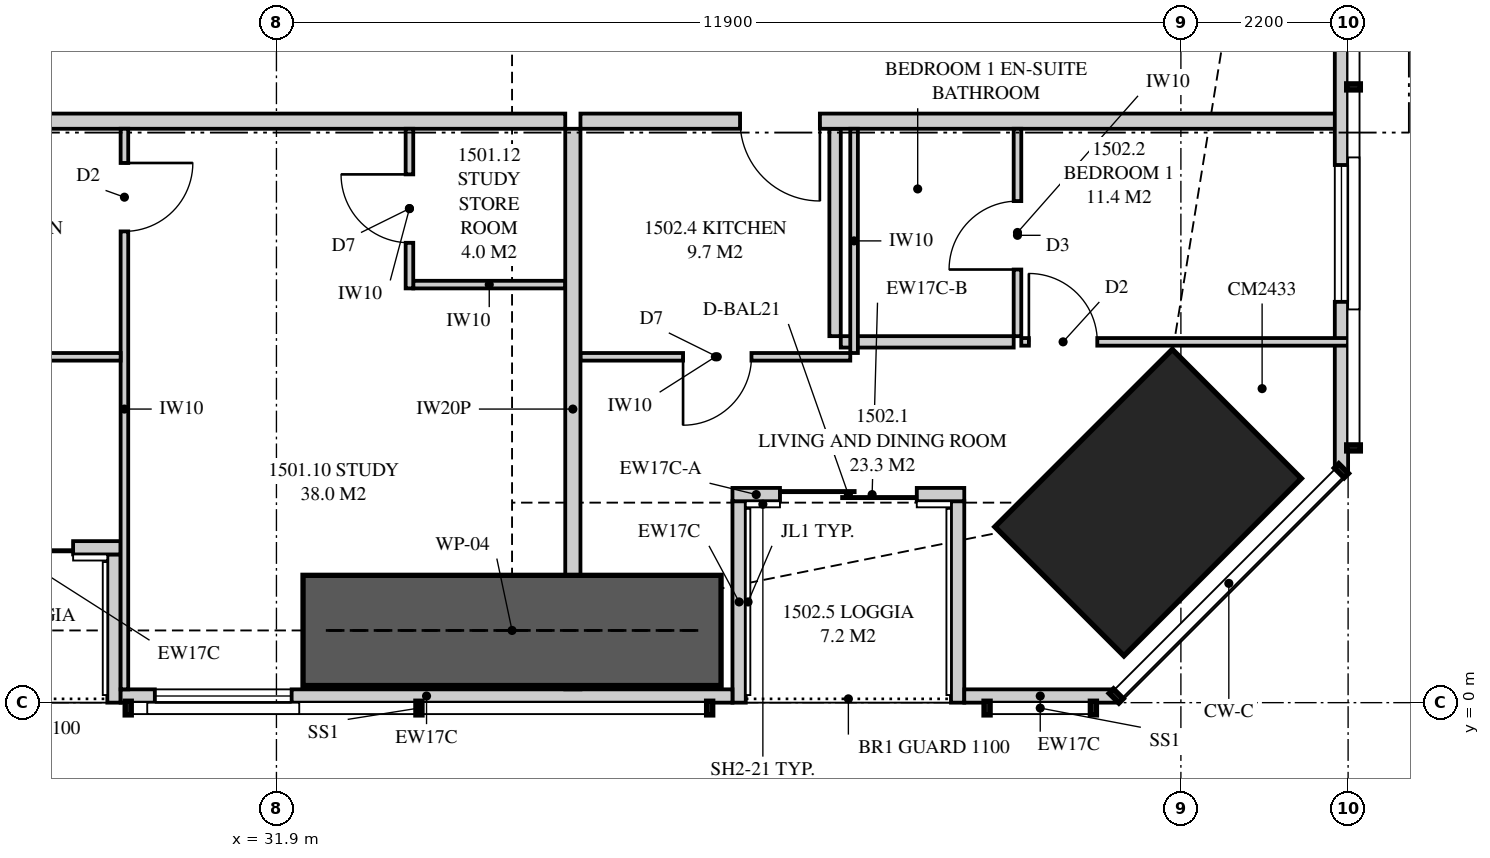
"""IFC4 building model, lengths in metres.
Left out: names, types, materials, properties, quantities, classifications, styles, units other than length and angle.
Written with IfcOpenShell. Run it as: python <this file> out.ifc"""

import sys

from ifc_helpers import new_model, si_unit, direction, frame, frame_2d, origin, origin_2d, place, context, subcontext, project, spatial, polyline, rectangle, outline, extrude, element, fill, save


model = new_model("IFC4")
c1 = context("Model", 3, precision=1e-05, world=origin(), true_north=direction((0.0, 1.0)))
c2 = subcontext(c1, "Body", "Model", "MODEL_VIEW")
j1 = project(units=[si_unit("LENGTHUNIT", "METRE"), si_unit("PLANEANGLEUNIT", "RADIAN")], contexts=[c1])
p1 = place(None, origin())
s1 = spatial("IfcSite", under=j1, at=p1, CompositionType="ELEMENT")
p2 = place(p1, origin())
s2 = spatial("IfcBuilding", under=s1, at=p2, CompositionType="ELEMENT")
p3 = place(p2, frame((0.0, 0.0, 57.85)))
s3 = spatial("IfcBuildingStorey", under=s2, at=p3, CompositionType="ELEMENT", Elevation=57.85)
p4 = place(p3, frame((43.369, 2.631, 0.0), z_axis=(0.0, 0.0, 1.0), x_axis=(-0.707106781187, 0.707106781187, 0.0)))
e1 = element("IfcColumn", 1, at=p4, inside=s3, PredefinedType="COLUMN", context=c2, shape_type="SweptSolid", body=[
    extrude(rectangle(XDim=2.4, YDim=3.3, at=origin_2d()), origin(), (0.0, 0.0, 1.0), 3.35),
])
p5 = place(p3, frame((29.85, 0.087, 0.0), z_axis=(0.0, 0.0, 1.0), x_axis=(1.0, 0.0, 0.0)))
e2 = element("IfcWall", 2, at=p5, inside=s3, PredefinedType="SOLIDWALL", context=c2, shape_type="SweptSolid", body=[
    extrude(outline(polyline([(0.0, 0.0), (8.05, 0.0), (8.05, 3.11), (5.354, 3.11), (5.354, 2.15), (5.306, 2.15), (5.306, 3.11), (5.15, 3.11), (5.15, 2.15), (0.0, 2.15), (0.0, 0.0)])), frame((0.0, 0.087, 0.0), z_axis=(0.0, -1.0, 0.0), x_axis=(1.0, 0.0, 0.0)), (0.0, 0.0, 1.0), 0.175),
])
p6 = place(p5, frame((0.45, 0.0, 0.4)))
e3 = element("IfcOpeningElement", 3, at=p6, cuts=e2, PredefinedType="OPENING", context=c2, shape_type="SweptSolid", body=[
    extrude(rectangle(XDim=1.8, YDim=1.7, at=frame_2d((0.9, 0.85))), frame((0.0, 0.097, 0.0), z_axis=(0.0, -1.0, 0.0), x_axis=(1.0, 0.0, 0.0)), (0.0, 0.0, 1.0), 0.195),
])
p7 = place(p3, frame((40.95, 0.087, 0.0), z_axis=(0.0, 0.0, 1.0), x_axis=(1.0, 0.0, 0.0)))
e4 = element("IfcWall", 4, at=p7, inside=s3, PredefinedType="SOLIDWALL", context=c2, shape_type="SweptSolid", body=[
    extrude(rectangle(XDim=1.999, YDim=0.175, at=frame_2d((1.0, 0.0))), origin(), (0.0, 0.0, 1.0), 3.11),
])
p8 = place(p3, frame((26.8, 2.038, 0.0), z_axis=(0.0, 0.0, 1.0), x_axis=(1.0, 0.0, 0.0)))
e5 = element("IfcWall", 5, at=p8, inside=s3, PredefinedType="SOLIDWALL", context=c2, shape_type="SweptSolid", body=[
    extrude(rectangle(XDim=3.05, YDim=0.175, at=frame_2d((1.525, 0.0))), origin(), (0.0, 0.0, 1.0), 3.11),
])
p9 = place(p8, frame((0.625, 0.0, 0.0)))
e6 = element("IfcOpeningElement", 6, at=p9, cuts=e5, PredefinedType="OPENING", context=c2, shape_type="SweptSolid", body=[
    extrude(rectangle(XDim=1.8, YDim=2.1, at=frame_2d((0.9, 1.05))), frame((0.0, 0.097, 0.0), z_axis=(0.0, -1.0, 0.0), x_axis=(1.0, 0.0, 0.0)), (0.0, 0.0, 1.0), 0.195),
])
p10 = place(p3, frame((29.762, 0.0, 0.0), z_axis=(0.0, 0.0, 1.0), x_axis=(0.0, 1.0, 0.0)))
e7 = element("IfcWall", 7, at=p10, inside=s3, PredefinedType="SOLIDWALL", context=c2, shape_type="SweptSolid", body=[
    extrude(outline(polyline([(0.0, 0.0), (1.95, 0.0), (1.95, 3.11), (1.75, 3.11), (1.75, 2.15), (0.15, 2.15), (0.15, 3.11), (0.0, 3.11), (0.0, 0.0)])), frame((0.0, 0.087, 0.0), z_axis=(0.0, -1.0, 0.0), x_axis=(1.0, 0.0, 0.0)), (0.0, 0.0, 1.0), 0.175),
])
p11 = place(p3, frame((37.9, 2.738, 0.0), z_axis=(0.0, 0.0, 1.0), x_axis=(1.0, 0.0, 0.0)))
e8 = element("IfcWall", 8, at=p11, inside=s3, PredefinedType="SOLIDWALL", context=c2, shape_type="SweptSolid", body=[
    extrude(rectangle(XDim=0.625, YDim=0.175, at=frame_2d((0.312, 0.0))), origin(), (0.0, 0.0, 1.0), 2.51),
])
p12 = place(p3, frame((38.525, 2.738, 0.0), z_axis=(0.0, 0.0, 1.0), x_axis=(1.0, 0.0, 0.0)))
e9 = element("IfcWall", 9, at=p12, inside=s3, PredefinedType="SOLIDWALL", context=c2, shape_type="SweptSolid", body=[
    extrude(rectangle(XDim=2.425, YDim=0.175, at=frame_2d((1.212, 0.0))), origin(), (0.0, 0.0, 1.0), 2.15),
])
p13 = place(p12, origin())
e10 = element("IfcOpeningElement", 10, at=p13, cuts=e9, PredefinedType="OPENING", context=c2, shape_type="SweptSolid", body=[
    extrude(rectangle(XDim=1.8, YDim=2.1, at=frame_2d((0.9, 1.05))), frame((0.0, 0.097, 0.0), z_axis=(0.0, -1.0, 0.0), x_axis=(1.0, 0.0, 0.0)), (0.0, 0.0, 1.0), 0.195),
])
p14 = place(p3, frame((37.988, 0.0, 0.0), z_axis=(0.0, 0.0, 1.0), x_axis=(0.0, 1.0, 0.0)))
e11 = element("IfcWall", 11, at=p14, inside=s3, PredefinedType="SOLIDWALL", context=c2, shape_type="SweptSolid", body=[
    extrude(outline(polyline([(0.0, 0.0), (2.65, 0.0), (2.65, 2.51), (2.384, 2.51), (2.384, 2.15), (0.717, 2.15), (0.717, 3.11), (0.0, 3.11), (0.0, 0.0)])), frame((0.0, 0.087, 0.0), z_axis=(0.0, -1.0, 0.0), x_axis=(1.0, 0.0, 0.0)), (0.0, 0.0, 1.0), 0.175),
])
p15 = place(p3, frame((40.863, 0.0, 0.0), z_axis=(0.0, 0.0, 1.0), x_axis=(0.0, 1.0, 0.0)))
e12 = element("IfcWall", 12, at=p15, inside=s3, PredefinedType="SOLIDWALL", context=c2, shape_type="SweptSolid", body=[
    extrude(outline(polyline([(0.0, 0.0), (2.65, 0.0), (2.65, 2.15), (1.294, 2.15), (1.294, 3.11), (0.0, 3.11), (0.0, 0.0)])), frame((0.0, 0.087, 0.0), z_axis=(0.0, -1.0, 0.0), x_axis=(1.0, 0.0, 0.0)), (0.0, 0.0, 1.0), 0.175),
])
p16 = place(p3, frame((45.913, 3.051, 0.0), z_axis=(0.0, 0.0, 1.0), x_axis=(0.0, 1.0, 0.0)))
e13 = element("IfcWall", 13, at=p16, inside=s3, PredefinedType="SOLIDWALL", context=c2, shape_type="SweptSolid", body=[
    extrude(outline(polyline([(0.0, 0.0), (31.897, 0.0), (31.897, 3.11), (22.167, 3.11), (22.167, 2.15), (22.074, 2.15), (22.074, 3.11), (21.949, 3.11), (21.949, 2.15), (9.949, 2.15), (9.949, 3.11), (9.823, 3.11), (9.823, 2.15), (9.73, 2.15), (9.73, 3.11), (0.0, 3.11), (0.0, 0.0)])), frame((0.0, 0.087, 0.0), z_axis=(0.0, -1.0, 0.0), x_axis=(1.0, 0.0, 0.0)), (0.0, 0.0, 1.0), 0.175),
])
p17 = place(p16, frame((2.222, 0.0, 0.4)))
e14 = element("IfcOpeningElement", 14, at=p17, cuts=e13, PredefinedType="OPENING", context=c2, shape_type="SweptSolid", body=[
    extrude(rectangle(XDim=1.8, YDim=1.7, at=frame_2d((0.9, 0.85))), frame((0.0, 0.097, 0.0), z_axis=(0.0, -1.0, 0.0), x_axis=(1.0, 0.0, 0.0)), (0.0, 0.0, 1.0), 0.195),
])
p18 = place(p16, frame((14.849, 0.0, 0.4)))
e15 = element("IfcOpeningElement", 15, at=p18, cuts=e13, PredefinedType="OPENING", context=c2, shape_type="SweptSolid", body=[
    extrude(rectangle(XDim=1.2, YDim=1.7, at=frame_2d((0.6, 0.85))), frame((0.0, 0.097, 0.0), z_axis=(0.0, -1.0, 0.0), x_axis=(1.0, 0.0, 0.0)), (0.0, 0.0, 1.0), 0.195),
])
p19 = place(p16, frame((27.375, 0.0, 0.4)))
e16 = element("IfcOpeningElement", 16, at=p19, cuts=e13, PredefinedType="OPENING", context=c2, shape_type="SweptSolid", body=[
    extrude(rectangle(XDim=1.8, YDim=1.7, at=frame_2d((0.9, 0.85))), frame((0.0, 0.097, 0.0), z_axis=(0.0, -1.0, 0.0), x_axis=(1.0, 0.0, 0.0)), (0.0, 0.0, 1.0), 0.195),
])
p20 = place(p3, frame((35.8, 0.175, 0.0), z_axis=(0.0, 0.0, 1.0), x_axis=(0.0, 1.0, 0.0)))
e17 = element("IfcWall", 17, at=p20, inside=s3, PredefinedType="PARTITIONING", context=c2, shape_type="SweptSolid", body=[
    extrude(outline(polyline([(0.008, 3.11), (0.0, 3.11), (0.0, 0.0), (0.529, 0.0), (0.529, 0.957), (1.021, 0.957), (1.021, 0.0), (7.375, 0.0), (7.375, 3.11), (3.766, 3.11), (3.766, 2.51), (1.864, 2.51), (1.864, 2.15), (1.021, 2.15), (1.021, 1.193), (0.529, 1.193), (0.529, 2.15), (0.008, 2.15), (0.008, 3.11)])), frame((0.0, 0.1, 0.0), z_axis=(0.0, -1.0, 0.0), x_axis=(1.0, 0.0, 0.0)), (0.0, 0.0, 1.0), 0.2),
])
p21 = place(p3, frame((29.9, 0.175, 0.0), z_axis=(0.0, 0.0, 1.0), x_axis=(0.0, 1.0, 0.0)))
e18 = element("IfcWall", 18, at=p21, inside=s3, PredefinedType="PARTITIONING", context=c2, shape_type="SweptSolid", body=[
    extrude(outline(polyline([(0.0, 0.0), (7.375, 0.0), (7.375, 3.11), (1.635, 3.11), (1.635, 2.15), (0.0, 2.15), (0.0, 3.11), (0.0, 0.0)])), frame((0.0, 0.05, 0.0), z_axis=(0.0, -1.0, 0.0), x_axis=(1.0, 0.0, 0.0)), (0.0, 0.0, 1.0), 0.1),
])
p22 = place(p21, frame((6.025, 0.0, 0.0)))
e19 = element("IfcOpeningElement", 19, at=p22, cuts=e18, PredefinedType="OPENING", context=c2, shape_type="SweptSolid", body=[
    extrude(rectangle(XDim=0.9, YDim=2.1, at=frame_2d((0.45, 1.05))), frame((0.0, 0.06, 0.0), z_axis=(0.0, -1.0, 0.0), x_axis=(1.0, 0.0, 0.0)), (0.0, 0.0, 1.0), 0.12),
])
p23 = place(p3, frame((26.35, 4.55, 0.0), z_axis=(0.0, 0.0, 1.0), x_axis=(1.0, 0.0, 0.0)))
e20 = element("IfcWall", 20, at=p23, inside=s3, PredefinedType="PARTITIONING", context=c2, shape_type="SweptSolid", body=[
    extrude(rectangle(XDim=3.5, YDim=0.1, at=frame_2d((1.75, 0.0))), origin(), (0.0, 0.0, 1.0), 3.11),
])
p24 = place(p23, frame((1.3, 0.0, 0.0)))
e21 = element("IfcOpeningElement", 21, at=p24, cuts=e20, PredefinedType="OPENING", context=c2, shape_type="SweptSolid", body=[
    extrude(rectangle(XDim=0.9, YDim=2.1, at=frame_2d((0.45, 1.05))), frame((0.0, 0.06, 0.0), z_axis=(0.0, -1.0, 0.0), x_axis=(1.0, 0.0, 0.0)), (0.0, 0.0, 1.0), 0.12),
])
p25 = place(p3, frame((35.9, 7.65, 0.0), z_axis=(0.0, 0.0, 1.0), x_axis=(1.0, 0.0, 0.0)))
e22 = element("IfcWall", 22, at=p25, inside=s3, PredefinedType="PARTITIONING", context=c2, shape_type="SweptSolid", body=[
    extrude(outline(polyline([(0.0, 0.0), (10.1, 0.0), (10.1, 3.11), (9.204, 3.11), (9.204, 2.15), (7.361, 2.15), (7.361, 3.11), (0.0, 3.11), (0.0, 0.0)])), frame((0.0, 0.1, 0.0), z_axis=(0.0, -1.0, 0.0), x_axis=(1.0, 0.0, 0.0)), (0.0, 0.0, 1.0), 0.2),
])
p26 = place(p25, frame((2.1, 0.0, 0.0)))
e23 = element("IfcOpeningElement", 23, at=p26, cuts=e22, PredefinedType="OPENING", context=c2, shape_type="SweptSolid", body=[
    extrude(rectangle(XDim=1.05, YDim=2.2, at=frame_2d((0.525, 1.1))), frame((0.0, 0.11, 0.0), z_axis=(0.0, -1.0, 0.0), x_axis=(1.0, 0.0, 0.0)), (0.0, 0.0, 1.0), 0.22),
])
p27 = place(p3, frame((41.65, 4.822, 0.0), z_axis=(0.0, 0.0, 1.0), x_axis=(0.0, 1.0, 0.0)))
e24 = element("IfcWall", 24, at=p27, inside=s3, PredefinedType="PARTITIONING", context=c2, shape_type="SweptSolid", body=[
    extrude(rectangle(XDim=2.728, YDim=0.1, at=frame_2d((1.364, 0.0))), origin(), (0.0, 0.0, 1.0), 3.11),
])
p28 = place(p27, frame((0.877, 0.0, 0.0)))
e25 = element("IfcOpeningElement", 25, at=p28, cuts=e24, PredefinedType="OPENING", context=c2, shape_type="SweptSolid", body=[
    extrude(rectangle(XDim=0.9, YDim=2.1, at=frame_2d((0.45, 1.05))), frame((0.0, 0.06, 0.0), z_axis=(0.0, -1.0, 0.0), x_axis=(1.0, 0.0, 0.0)), (0.0, 0.0, 1.0), 0.12),
])
p29 = place(p3, frame((41.7, 4.747, 0.0), z_axis=(0.0, 0.0, 1.0), x_axis=(1.0, 0.0, 0.0)))
e26 = element("IfcWall", 26, at=p29, inside=s3, PredefinedType="PARTITIONING", context=c2, shape_type="SweptSolid", body=[
    extrude(outline(polyline([(0.0, 0.0), (4.3, 0.0), (4.3, 3.11), (2.883, 3.11), (2.883, 2.15), (1.14, 2.15), (1.14, 3.11), (0.0, 3.11), (0.0, 0.0)])), frame((0.0, 0.05, 0.0), z_axis=(0.0, -1.0, 0.0), x_axis=(1.0, 0.0, 0.0)), (0.0, 0.0, 1.0), 0.1),
])
p30 = place(p29, frame((0.1, 0.0, 0.0)))
e27 = element("IfcOpeningElement", 27, at=p30, cuts=e26, PredefinedType="OPENING", context=c2, shape_type="SweptSolid", body=[
    extrude(rectangle(XDim=0.9, YDim=2.1, at=frame_2d((0.45, 1.05))), frame((0.0, 0.06, 0.0), z_axis=(0.0, -1.0, 0.0), x_axis=(1.0, 0.0, 0.0)), (0.0, 0.0, 1.0), 0.12),
])
p31 = place(p3, frame((39.325, 4.747, 0.0), z_axis=(0.0, 0.0, 1.0), x_axis=(1.0, 0.0, 0.0)))
e28 = element("IfcWall", 28, at=p31, inside=s3, PredefinedType="PLUMBINGWALL", context=c2, shape_type="SweptSolid", body=[
    extrude(rectangle(XDim=2.275, YDim=0.15, at=frame_2d((1.138, 0.0))), origin(), (0.0, 0.0, 1.0), 3.11),
])
p32 = place(p3, frame((39.25, 4.822, 0.0), z_axis=(0.0, 0.0, 1.0), x_axis=(0.0, 1.0, 0.0)))
e29 = element("IfcWall", 29, at=p32, inside=s3, PredefinedType="PLUMBINGWALL", context=c2, shape_type="SweptSolid", body=[
    extrude(rectangle(XDim=2.728, YDim=0.15, at=frame_2d((1.364, 0.0))), origin(), (0.0, 0.0, 1.0), 3.11),
])
p33 = place(p3, frame((35.9, 4.55, 0.0), z_axis=(0.0, 0.0, 1.0), x_axis=(1.0, 0.0, 0.0)))
e30 = element("IfcWall", 30, at=p33, inside=s3, PredefinedType="PARTITIONING", context=c2, shape_type="SweptSolid", body=[
    extrude(rectangle(XDim=3.55, YDim=0.1, at=frame_2d((1.775, 0.0))), origin(), (0.0, 0.0, 1.0), 3.11),
])
p34 = place(p33, frame((1.35, 0.0, 0.0)))
e31 = element("IfcOpeningElement", 31, at=p34, cuts=e30, PredefinedType="OPENING", context=c2, shape_type="SweptSolid", body=[
    extrude(rectangle(XDim=0.9, YDim=2.1, at=frame_2d((0.45, 1.05))), frame((0.0, 0.06, 0.0), z_axis=(0.0, -1.0, 0.0), x_axis=(1.0, 0.0, 0.0)), (0.0, 0.0, 1.0), 0.12),
])
p35 = place(p3, frame((39.5, 4.6, 0.0), z_axis=(0.0, 0.0, 1.0), x_axis=(0.0, 1.0, 0.0)))
e32 = element("IfcWall", 32, at=p35, inside=s3, PredefinedType="PARTITIONING", context=c2, shape_type="SweptSolid", body=[
    extrude(rectangle(XDim=2.95, YDim=0.1, at=frame_2d((1.475, 0.0))), origin(), (0.0, 0.0, 1.0), 3.11),
])
p36 = place(p3, frame((24.05, 7.65, 0.0), z_axis=(0.0, 0.0, 1.0), x_axis=(1.0, 0.0, 0.0)))
e33 = element("IfcWall", 33, at=p36, inside=s3, PredefinedType="PARTITIONING", context=c2, shape_type="SweptSolid", body=[
    extrude(outline(polyline([(0.0, 0.0), (11.65, 0.0), (11.65, 3.11), (11.287, 3.11), (11.287, 2.541), (10.613, 2.541), (10.613, 3.11), (0.287, 3.11), (0.287, 2.541), (0.0, 2.541), (0.0, 3.11), (0.0, 0.0)])), frame((0.0, 0.1, 0.0), z_axis=(0.0, -1.0, 0.0), x_axis=(1.0, 0.0, 0.0)), (0.0, 0.0, 1.0), 0.2),
])
p37 = place(p3, frame((33.65, 7.55, 0.0), z_axis=(0.0, 0.0, 1.0), x_axis=(0.0, -1.0, 0.0)))
e34 = element("IfcWall", 34, at=p37, inside=s3, PredefinedType="PARTITIONING", context=c2, shape_type="SweptSolid", body=[
    extrude(rectangle(XDim=2.1, YDim=0.1, at=frame_2d((1.05, 0.0))), origin(), (0.0, 0.0, 1.0), 3.11),
])
p38 = place(p37, frame((0.6, 0.0, 0.0)))
e35 = element("IfcOpeningElement", 35, at=p38, cuts=e34, PredefinedType="OPENING", context=c2, shape_type="SweptSolid", body=[
    extrude(rectangle(XDim=0.9, YDim=2.1, at=frame_2d((0.45, 1.05))), frame((0.0, 0.06, 0.0), z_axis=(0.0, -1.0, 0.0), x_axis=(1.0, 0.0, 0.0)), (0.0, 0.0, 1.0), 0.12),
])
p39 = place(p3, frame((35.7, 5.5, 0.0), z_axis=(0.0, 0.0, 1.0), x_axis=(-1.0, 0.0, 0.0)))
e36 = element("IfcWall", 36, at=p39, inside=s3, PredefinedType="PARTITIONING", context=c2, shape_type="SweptSolid", body=[
    extrude(outline(polyline([(0.0, 0.0), (2.0, 0.0), (2.0, 3.11), (0.987, 3.11), (0.987, 2.541), (0.413, 2.541), (0.413, 3.11), (0.0, 3.11), (0.0, 0.0)])), frame((0.0, 0.05, 0.0), z_axis=(0.0, -1.0, 0.0), x_axis=(1.0, 0.0, 0.0)), (0.0, 0.0, 1.0), 0.1),
])
p40 = place(p3, frame((32.25, 0.95, 0.0), z_axis=(0.0, 0.0, 1.0), x_axis=(1.0, 0.0, 0.0)))
e37 = element("IfcWall", 37, at=p40, inside=s3, PredefinedType="SHEAR", context=c2, shape_type="SweptSolid", body=[
    extrude(rectangle(XDim=5.5, YDim=1.45, at=frame_2d((2.75, 0.0))), origin(), (0.0, 0.0, 1.0), 3.35),
])
p41 = place(p9, origin())
e38 = element("IfcDoor", 38, at=p41, inside=s3, OperationType="SLIDING_TO_LEFT", PredefinedType="DOOR", context=c2, shape_type="SweptSolid", body=[
    extrude(rectangle(XDim=1.8, YDim=2.1, at=frame_2d((0.9, 1.05))), frame((0.0, 0.025, 0.0), z_axis=(0.0, -1.0, 0.0), x_axis=(1.0, 0.0, 0.0)), (0.0, 0.0, 1.0), 0.05),
])
fill(e6, e38)
p42 = place(p6, origin())
e39 = element("IfcWindow", 39, at=p42, inside=s3, PartitioningType="SINGLE_PANEL", PredefinedType="WINDOW", context=c2, shape_type="SweptSolid", body=[
    extrude(rectangle(XDim=1.8, YDim=1.7, at=frame_2d((0.9, 0.85))), frame((0.0, 0.03, 0.0), z_axis=(0.0, -1.0, 0.0), x_axis=(1.0, 0.0, 0.0)), (0.0, 0.0, 1.0), 0.06),
])
fill(e3, e39)
p43 = place(p13, origin())
e40 = element("IfcDoor", 40, at=p43, inside=s3, OperationType="SLIDING_TO_LEFT", PredefinedType="DOOR", context=c2, shape_type="SweptSolid", body=[
    extrude(rectangle(XDim=1.8, YDim=2.1, at=frame_2d((0.9, 1.05))), frame((0.0, 0.025, 0.0), z_axis=(0.0, -1.0, 0.0), x_axis=(1.0, 0.0, 0.0)), (0.0, 0.0, 1.0), 0.05),
])
fill(e10, e40)
p44 = place(p17, origin())
e41 = element("IfcWindow", 41, at=p44, inside=s3, PartitioningType="SINGLE_PANEL", PredefinedType="WINDOW", context=c2, shape_type="SweptSolid", body=[
    extrude(rectangle(XDim=1.8, YDim=1.7, at=frame_2d((0.9, 0.85))), frame((0.0, 0.03, 0.0), z_axis=(0.0, -1.0, 0.0), x_axis=(1.0, 0.0, 0.0)), (0.0, 0.0, 1.0), 0.06),
])
fill(e14, e41)
p45 = place(p22, frame((0.9, 0.0, 0.0), z_axis=(0.0, 0.0, 1.0), x_axis=(-1.0, 0.0, 0.0)))
e42 = element("IfcDoor", 42, at=p45, inside=s3, OperationType="SINGLE_SWING_LEFT", PredefinedType="DOOR", context=c2, shape_type="SweptSolid", body=[
    extrude(rectangle(XDim=0.9, YDim=2.1, at=frame_2d((0.45, 1.05))), frame((0.0, 0.025, 0.0), z_axis=(0.0, -1.0, 0.0), x_axis=(1.0, 0.0, 0.0)), (0.0, 0.0, 1.0), 0.05),
])
fill(e19, e42)
p46 = place(p26, frame((1.05, 0.0, 0.0), z_axis=(0.0, 0.0, 1.0), x_axis=(-1.0, 0.0, 0.0)))
e43 = element("IfcDoor", 43, at=p46, inside=s3, OperationType="SINGLE_SWING_LEFT", PredefinedType="DOOR", context=c2, shape_type="SweptSolid", body=[
    extrude(rectangle(XDim=1.05, YDim=2.2, at=frame_2d((0.525, 1.1))), frame((0.0, 0.025, 0.0), z_axis=(0.0, -1.0, 0.0), x_axis=(1.0, 0.0, 0.0)), (0.0, 0.0, 1.0), 0.05),
])
fill(e23, e43)
p47 = place(p30, origin())
e44 = element("IfcDoor", 44, at=p47, inside=s3, OperationType="SINGLE_SWING_LEFT", PredefinedType="DOOR", context=c2, shape_type="SweptSolid", body=[
    extrude(rectangle(XDim=0.9, YDim=2.1, at=frame_2d((0.45, 1.05))), frame((0.0, 0.025, 0.0), z_axis=(0.0, -1.0, 0.0), x_axis=(1.0, 0.0, 0.0)), (0.0, 0.0, 1.0), 0.05),
])
fill(e27, e44)
p48 = place(p28, origin())
e45 = element("IfcDoor", 45, at=p48, inside=s3, OperationType="SINGLE_SWING_LEFT", PredefinedType="DOOR", context=c2, shape_type="SweptSolid", body=[
    extrude(rectangle(XDim=0.9, YDim=2.1, at=frame_2d((0.45, 1.05))), frame((0.0, 0.025, 0.0), z_axis=(0.0, -1.0, 0.0), x_axis=(1.0, 0.0, 0.0)), (0.0, 0.0, 1.0), 0.05),
])
fill(e25, e45)
p49 = place(p34, frame((0.9, 0.0, 0.0), z_axis=(0.0, 0.0, 1.0), x_axis=(-1.0, 0.0, 0.0)))
e46 = element("IfcDoor", 46, at=p49, inside=s3, OperationType="SINGLE_SWING_RIGHT", PredefinedType="DOOR", context=c2, shape_type="SweptSolid", body=[
    extrude(rectangle(XDim=0.9, YDim=2.1, at=frame_2d((0.45, 1.05))), frame((0.0, 0.025, 0.0), z_axis=(0.0, -1.0, 0.0), x_axis=(1.0, 0.0, 0.0)), (0.0, 0.0, 1.0), 0.05),
])
fill(e31, e46)
p50 = place(p38, frame((0.9, 0.0, 0.0), z_axis=(0.0, 0.0, 1.0), x_axis=(-1.0, 0.0, 0.0)))
e47 = element("IfcDoor", 47, at=p50, inside=s3, OperationType="SINGLE_SWING_RIGHT", PredefinedType="DOOR", context=c2, shape_type="SweptSolid", body=[
    extrude(rectangle(XDim=0.9, YDim=2.1, at=frame_2d((0.45, 1.05))), frame((0.0, 0.025, 0.0), z_axis=(0.0, -1.0, 0.0), x_axis=(1.0, 0.0, 0.0)), (0.0, 0.0, 1.0), 0.05),
])
fill(e35, e47)
save(model, sys.argv[1])
